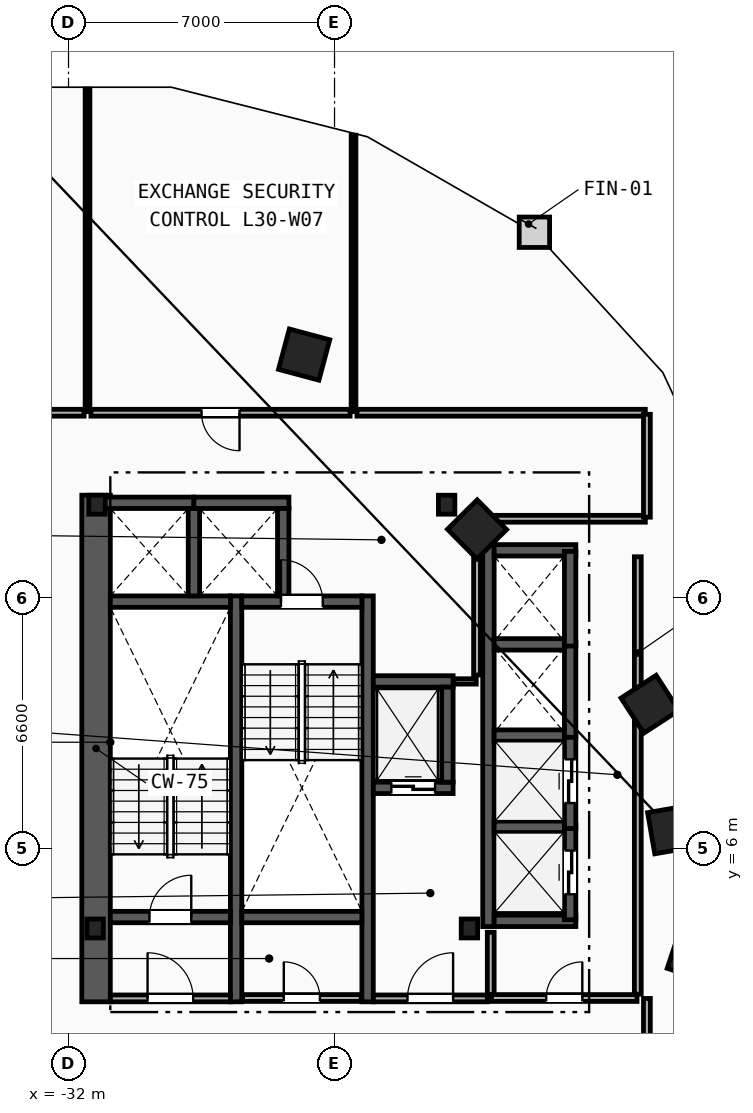
"""IFC4 building model, lengths in metres.
Left out: names, types, materials, properties, quantities, classifications, styles, units other than length and angle.
Written with IfcOpenShell. Run it as: python <this file> out.ifc"""

import sys

from ifc_helpers import new_model, si_unit, direction, frame, frame_2d, origin, origin_2d, place, context, subcontext, project, spatial, rectangle, i_section, extrude, element, fill, save


model = new_model("IFC4")
c1 = context("Model", 3, precision=1e-05, world=origin(), true_north=direction((0.0, 1.0)))
c2 = subcontext(c1, "Body", "Model", "MODEL_VIEW")
j1 = project(units=[si_unit("LENGTHUNIT", "METRE"), si_unit("PLANEANGLEUNIT", "RADIAN")], contexts=[c1])
p1 = place(None, origin())
s1 = spatial("IfcSite", under=j1, at=p1, CompositionType="ELEMENT")
p2 = place(p1, origin())
s2 = spatial("IfcBuilding", under=s1, at=p2, CompositionType="ELEMENT")
p3 = place(p2, frame((0.0, 0.0, 117.8)))
s3 = spatial("IfcBuildingStorey", under=s2, at=p3, CompositionType="ELEMENT", Elevation=117.8)
for number, where, z_axis, x_axis in (
    (1, (-31.3, 3.9, 0.0), (0.0, 0.0, 1.0), (1.0, 0.0, 0.0)),
    (2, (-21.45, 3.9, 0.0), (0.0, 0.0, 1.0), (1.0, 0.0, 0.0)),
    (3, (-22.05, 15.05, 0.0), (0.0, 0.0, 1.0), (1.0, 0.0, 0.0)),
    (4, (-31.25, 15.05, 0.0), (0.0, 0.0, 1.0), (1.0, 0.0, 0.0)),
):
    element("IfcColumn", number, at=place(p3, frame(where, z_axis=z_axis, x_axis=x_axis)), inside=s3, PredefinedType="COLUMN", context=c2, shape_type="SweptSolid", body=[
        extrude(i_section(OverallWidth=0.432, OverallDepth=0.498, WebThickness=0.056, FlangeThickness=0.089, FilletRadius=0.018, at=origin_2d()), origin(), (0.0, 0.0, 1.0), 3.6),
    ])
for number, where, z_axis, x_axis in (
    (5, (-15.55, 3.2, 0.0), (0.0, 0.0, 1.0), (0.315, 0.949, 0.0)),
    (6, (-16.125, 6.5, 0.0), (0.0, 0.0, 1.0), (-0.172, 0.985, 0.0)),
    (7, (-16.7, 9.8, 0.0), (0.0, 0.0, 1.0), (-0.544, 0.839, 0.0)),
    (8, (-21.25, 14.4, 0.0), (0.0, 0.0, 1.0), (-0.703, 0.711, 0.0)),
    (9, (-25.8, 19.0, 0.0), (0.0, 0.0, 1.0), (-0.966, 0.259, 0.0)),
):
    element("IfcColumn", number, at=place(p3, frame(where, z_axis=z_axis, x_axis=x_axis)), inside=s3, PredefinedType="COLUMN", context=c2, shape_type="SweptSolid", body=[
        extrude(rectangle(XDim=1.1, YDim=1.1, at=origin_2d()), origin(), (0.0, 0.0, 1.0), 3.6),
    ])
p4 = place(p3, frame((-31.275, 1.97, 0.0), z_axis=(0.0, 0.0, 1.0), x_axis=(0.0, 1.0, 0.0)))
e10 = element("IfcWall", 10, at=p4, inside=s3, PredefinedType="SHEAR", context=c2, shape_type="SweptSolid", body=[
    extrude(rectangle(XDim=13.33, YDim=0.75, at=frame_2d((6.665, 0.0))), origin(), (0.0, 0.0, 1.0), 3.3),
])
for number, where, z_axis, x_axis in (
    (11, (-27.59, 1.97, 0.0), (0.0, 0.0, 1.0), (0.0, 1.0, 0.0)),
    (12, (-24.13, 1.97, 0.0), (0.0, 0.0, 1.0), (0.0, 1.0, 0.0)),
):
    element("IfcWall", number, at=place(p3, frame(where, z_axis=z_axis, x_axis=x_axis)), inside=s3, PredefinedType="SHEAR", context=c2, shape_type="SweptSolid", body=[
        extrude(rectangle(XDim=10.68, YDim=0.3, at=frame_2d((5.34, 0.0))), origin(), (0.0, 0.0, 1.0), 3.3),
    ])
p5 = place(p3, frame((-30.9, 4.2, 0.0), z_axis=(0.0, 0.0, 1.0), x_axis=(1.0, 0.0, 0.0)))
e13 = element("IfcWall", 13, at=p5, inside=s3, PredefinedType="SHEAR", context=c2, shape_type="SweptSolid", body=[
    extrude(rectangle(XDim=3.16, YDim=0.3, at=frame_2d((1.58, 0.0))), origin(), (0.0, 0.0, 1.0), 3.3),
])
p6 = place(p5, frame((1.03, 0.0, 0.0)))
e14 = element("IfcOpeningElement", 14, at=p6, cuts=e13, PredefinedType="OPENING", context=c2, shape_type="SweptSolid", body=[
    extrude(rectangle(XDim=1.1, YDim=2.15, at=frame_2d((0.55, 1.075))), frame((0.0, 0.16, 0.0), z_axis=(0.0, -1.0, 0.0), x_axis=(1.0, 0.0, 0.0)), (0.0, 0.0, 1.0), 0.32),
])
p7 = place(p3, frame((-30.9, 12.5, 0.0), z_axis=(0.0, 0.0, 1.0), x_axis=(1.0, 0.0, 0.0)))
e15 = element("IfcWall", 15, at=p7, inside=s3, PredefinedType="SHEAR", context=c2, shape_type="SweptSolid", body=[
    extrude(rectangle(XDim=3.16, YDim=0.3, at=frame_2d((1.58, 0.0))), origin(), (0.0, 0.0, 1.0), 3.3),
])
p8 = place(p3, frame((-27.44, 12.5, 0.0), z_axis=(0.0, 0.0, 1.0), x_axis=(1.0, 0.0, 0.0)))
e16 = element("IfcWall", 16, at=p8, inside=s3, PredefinedType="SHEAR", context=c2, shape_type="SweptSolid", body=[
    extrude(rectangle(XDim=3.16, YDim=0.3, at=frame_2d((1.58, 0.0))), origin(), (0.0, 0.0, 1.0), 3.3),
])
p9 = place(p8, frame((1.03, 0.0, 0.0)))
e17 = element("IfcOpeningElement", 17, at=p9, cuts=e16, PredefinedType="OPENING", context=c2, shape_type="SweptSolid", body=[
    extrude(rectangle(XDim=1.1, YDim=2.15, at=frame_2d((0.55, 1.075))), frame((0.0, 0.16, 0.0), z_axis=(0.0, -1.0, 0.0), x_axis=(1.0, 0.0, 0.0)), (0.0, 0.0, 1.0), 0.32),
])
p10 = place(p3, frame((-27.44, 4.2, 0.0), z_axis=(0.0, 0.0, 1.0), x_axis=(1.0, 0.0, 0.0)))
e18 = element("IfcWall", 18, at=p10, inside=s3, PredefinedType="SHEAR", context=c2, shape_type="SweptSolid", body=[
    extrude(rectangle(XDim=3.16, YDim=0.3, at=frame_2d((1.58, 0.0))), origin(), (0.0, 0.0, 1.0), 3.3),
])
p11 = place(p3, frame((-20.89, 2.15, 0.0), z_axis=(0.0, 0.0, 1.0), x_axis=(0.0, 1.0, 0.0)))
e19 = element("IfcWall", 19, at=p11, inside=s3, PredefinedType="PARTITIONING", context=c2, shape_type="SweptSolid", body=[
    extrude(rectangle(XDim=1.65, YDim=0.18, at=frame_2d((0.825, 0.0))), origin(), (0.0, 0.0, 1.0), 3.3),
])
p12 = place(p3, frame((-23.98, 2.06, 0.0), z_axis=(0.0, 0.0, 1.0), x_axis=(1.0, 0.0, 0.0)))
e20 = element("IfcWall", 20, at=p12, inside=s3, PredefinedType="PARTITIONING", context=c2, shape_type="SweptSolid", body=[
    extrude(rectangle(XDim=3.0, YDim=0.18, at=frame_2d((1.5, 0.0))), origin(), (0.0, 0.0, 1.0), 3.3),
])
p13 = place(p12, frame((0.9, 0.0, 0.0)))
e21 = element("IfcOpeningElement", 21, at=p13, cuts=e20, PredefinedType="OPENING", context=c2, shape_type="SweptSolid", body=[
    extrude(rectangle(XDim=1.2, YDim=2.15, at=frame_2d((0.6, 1.075))), frame((0.0, 0.1, 0.0), z_axis=(0.0, -1.0, 0.0), x_axis=(1.0, 0.0, 0.0)), (0.0, 0.0, 1.0), 0.2),
])
p14 = place(p3, frame((-30.9, 2.06, 0.0), z_axis=(0.0, 0.0, 1.0), x_axis=(1.0, 0.0, 0.0)))
e22 = element("IfcWall", 22, at=p14, inside=s3, PredefinedType="PARTITIONING", context=c2, shape_type="SweptSolid", body=[
    extrude(rectangle(XDim=3.16, YDim=0.18, at=frame_2d((1.58, 0.0))), origin(), (0.0, 0.0, 1.0), 3.3),
])
p15 = place(p14, frame((0.98, 0.0, 0.0)))
e23 = element("IfcOpeningElement", 23, at=p15, cuts=e22, PredefinedType="OPENING", context=c2, shape_type="SweptSolid", body=[
    extrude(rectangle(XDim=1.2, YDim=2.15, at=frame_2d((0.6, 1.075))), frame((0.0, 0.1, 0.0), z_axis=(0.0, -1.0, 0.0), x_axis=(1.0, 0.0, 0.0)), (0.0, 0.0, 1.0), 0.2),
])
p16 = place(p3, frame((-23.98, 7.6, 0.0), z_axis=(0.0, 0.0, 1.0), x_axis=(1.0, 0.0, 0.0)))
e24 = element("IfcWall", 24, at=p16, inside=s3, PredefinedType="SHEAR", context=c2, shape_type="SweptSolid", body=[
    extrude(rectangle(XDim=2.1, YDim=0.3, at=frame_2d((1.05, 0.0))), origin(), (0.0, 0.0, 1.0), 3.3),
])
p17 = place(p16, frame((0.475, 0.0, 0.0)))
e25 = element("IfcOpeningElement", 25, at=p17, cuts=e24, PredefinedType="OPENING", context=c2, shape_type="SweptSolid", body=[
    extrude(rectangle(XDim=1.15, YDim=2.2, at=frame_2d((0.575, 1.1))), frame((0.0, 0.16, 0.0), z_axis=(0.0, -1.0, 0.0), x_axis=(1.0, 0.0, 0.0)), (0.0, 0.0, 1.0), 0.32),
])
p18 = place(p3, frame((-23.98, 10.4, 0.0), z_axis=(0.0, 0.0, 1.0), x_axis=(1.0, 0.0, 0.0)))
e26 = element("IfcWall", 26, at=p18, inside=s3, PredefinedType="SHEAR", context=c2, shape_type="SweptSolid", body=[
    extrude(rectangle(XDim=2.1, YDim=0.3, at=frame_2d((1.05, 0.0))), origin(), (0.0, 0.0, 1.0), 3.3),
])
for number, where, z_axis, x_axis in (
    (27, (-22.03, 7.75, 0.0), (0.0, 0.0, 1.0), (0.0, 1.0, 0.0)),
    (28, (-31.2, 15.1, 0.0), (0.0, 0.0, 1.0), (1.0, 0.0, 0.0)),
):
    element("IfcWall", number, at=place(p3, frame(where, z_axis=z_axis, x_axis=x_axis)), inside=s3, PredefinedType="SHEAR", context=c2, shape_type="SweptSolid", body=[
        extrude(rectangle(XDim=2.5, YDim=0.3, at=frame_2d((1.25, 0.0))), origin(), (0.0, 0.0, 1.0), 3.3),
    ])
p19 = place(p3, frame((-28.7, 12.65, 0.0), z_axis=(0.0, 0.0, 1.0), x_axis=(0.0, 1.0, 0.0)))
e29 = element("IfcWall", 29, at=p19, inside=s3, PredefinedType="SHEAR", context=c2, shape_type="SweptSolid", body=[
    extrude(rectangle(XDim=2.3, YDim=0.3, at=frame_2d((1.15, 0.0))), origin(), (0.0, 0.0, 1.0), 3.3),
])
p20 = place(p3, frame((-28.7, 15.1, 0.0), z_axis=(0.0, 0.0, 1.0), x_axis=(1.0, 0.0, 0.0)))
e30 = element("IfcWall", 30, at=p20, inside=s3, PredefinedType="SHEAR", context=c2, shape_type="SweptSolid", body=[
    extrude(rectangle(XDim=2.5, YDim=0.3, at=frame_2d((1.25, 0.0))), origin(), (0.0, 0.0, 1.0), 3.3),
])
p21 = place(p3, frame((-26.35, 12.65, 0.0), z_axis=(0.0, 0.0, 1.0), x_axis=(0.0, 1.0, 0.0)))
e31 = element("IfcWall", 31, at=p21, inside=s3, PredefinedType="SHEAR", context=c2, shape_type="SweptSolid", body=[
    extrude(rectangle(XDim=2.3, YDim=0.3, at=frame_2d((1.15, 0.0))), origin(), (0.0, 0.0, 1.0), 3.3),
])
p22 = place(p3, frame((-20.95, 3.95, 0.0), z_axis=(0.0, 0.0, 1.0), x_axis=(0.0, 1.0, 0.0)))
e32 = element("IfcWall", 32, at=p22, inside=s3, PredefinedType="SHEAR", context=c2, shape_type="SweptSolid", body=[
    extrude(rectangle(XDim=10.05, YDim=0.3, at=frame_2d((5.025, 0.0))), origin(), (0.0, 0.0, 1.0), 3.3),
])
for number, where, z_axis, x_axis in (
    (33, (-20.8, 4.1, 0.0), (0.0, 0.0, 1.0), (1.0, 0.0, 0.0)),
    (34, (-20.8, 13.85, 0.0), (0.0, 0.0, 1.0), (1.0, 0.0, 0.0)),
):
    element("IfcWall", number, at=place(p3, frame(where, z_axis=z_axis, x_axis=x_axis)), inside=s3, PredefinedType="SHEAR", context=c2, shape_type="SweptSolid", body=[
        extrude(rectangle(XDim=2.15, YDim=0.3, at=frame_2d((1.075, 0.0))), origin(), (0.0, 0.0, 1.0), 3.3),
    ])
for number, where, z_axis, x_axis in (
    (35, (-20.8, 6.575, 0.0), (0.0, 0.0, 1.0), (1.0, 0.0, 0.0)),
    (36, (-20.8, 8.975, 0.0), (0.0, 0.0, 1.0), (1.0, 0.0, 0.0)),
    (37, (-20.8, 11.375, 0.0), (0.0, 0.0, 1.0), (1.0, 0.0, 0.0)),
):
    element("IfcWall", number, at=place(p3, frame(where, z_axis=z_axis, x_axis=x_axis)), inside=s3, PredefinedType="SHEAR", context=c2, shape_type="SweptSolid", body=[
        extrude(rectangle(XDim=1.85, YDim=0.3, at=frame_2d((0.925, 0.0))), origin(), (0.0, 0.0, 1.0), 3.3),
    ])
p23 = place(p3, frame((-18.8, 4.13, 0.0), z_axis=(0.0, 0.0, 1.0), x_axis=(0.0, 1.0, 0.0)))
e38 = element("IfcWall", 38, at=p23, inside=s3, PredefinedType="SHEAR", context=c2, shape_type="SweptSolid", body=[
    extrude(rectangle(XDim=2.49, YDim=0.3, at=frame_2d((1.245, 0.0))), origin(), (0.0, 0.0, 1.0), 3.3),
])
p24 = place(p23, frame((0.67, 0.0, 0.0)))
e39 = element("IfcOpeningElement", 39, at=p24, cuts=e38, PredefinedType="OPENING", context=c2, shape_type="SweptSolid", body=[
    extrude(rectangle(XDim=1.15, YDim=2.2, at=frame_2d((0.575, 1.1))), frame((0.0, 0.16, 0.0), z_axis=(0.0, -1.0, 0.0), x_axis=(1.0, 0.0, 0.0)), (0.0, 0.0, 1.0), 0.32),
])
p25 = place(p3, frame((-18.8, 6.53, 0.0), z_axis=(0.0, 0.0, 1.0), x_axis=(0.0, 1.0, 0.0)))
e40 = element("IfcWall", 40, at=p25, inside=s3, PredefinedType="SHEAR", context=c2, shape_type="SweptSolid", body=[
    extrude(rectangle(XDim=2.49, YDim=0.3, at=frame_2d((1.245, 0.0))), origin(), (0.0, 0.0, 1.0), 3.3),
])
p26 = place(p25, frame((0.67, 0.0, 0.0)))
e41 = element("IfcOpeningElement", 41, at=p26, cuts=e40, PredefinedType="OPENING", context=c2, shape_type="SweptSolid", body=[
    extrude(rectangle(XDim=1.15, YDim=2.2, at=frame_2d((0.575, 1.1))), frame((0.0, 0.16, 0.0), z_axis=(0.0, -1.0, 0.0), x_axis=(1.0, 0.0, 0.0)), (0.0, 0.0, 1.0), 0.32),
])
for number, where, z_axis, x_axis in (
    (42, (-18.8, 8.93, 0.0), (0.0, 0.0, 1.0), (0.0, 1.0, 0.0)),
    (43, (-18.8, 11.33, 0.0), (0.0, 0.0, 1.0), (0.0, 1.0, 0.0)),
):
    element("IfcWall", number, at=place(p3, frame(where, z_axis=z_axis, x_axis=x_axis)), inside=s3, PredefinedType="SHEAR", context=c2, shape_type="SweptSolid", body=[
        extrude(rectangle(XDim=2.49, YDim=0.3, at=frame_2d((1.245, 0.0))), origin(), (0.0, 0.0, 1.0), 3.3),
    ])
p27 = place(p3, frame((-17.02, 2.17, 0.0), z_axis=(0.0, 0.0, 1.0), x_axis=(0.0, 1.0, 0.0)))
e44 = element("IfcWall", 44, at=p27, inside=s3, PredefinedType="PARTITIONING", context=c2, shape_type="SweptSolid", body=[
    extrude(rectangle(XDim=11.51, YDim=0.18, at=frame_2d((5.755, 0.0))), origin(), (0.0, 0.0, 1.0), 3.3),
])
p28 = place(p3, frame((-20.87, 2.07, 0.0), z_axis=(0.0, 0.0, 1.0), x_axis=(1.0, 0.0, 0.0)))
e45 = element("IfcWall", 45, at=p28, inside=s3, PredefinedType="PARTITIONING", context=c2, shape_type="SweptSolid", body=[
    extrude(rectangle(XDim=3.83, YDim=0.18, at=frame_2d((1.915, 0.0))), origin(), (0.0, 0.0, 1.0), 3.3),
])
p29 = place(p28, frame((1.44, 0.0, 0.0)))
e46 = element("IfcOpeningElement", 46, at=p29, cuts=e45, PredefinedType="OPENING", context=c2, shape_type="SweptSolid", body=[
    extrude(rectangle(XDim=0.95, YDim=2.1, at=frame_2d((0.475, 1.05))), frame((0.0, 0.1, 0.0), z_axis=(0.0, -1.0, 0.0), x_axis=(1.0, 0.0, 0.0)), (0.0, 0.0, 1.0), 0.2),
])
p30 = place(p3, frame((-21.86, 10.4, 0.0), z_axis=(0.0, 0.0, 1.0), x_axis=(1.0, 0.0, 0.0)))
e47 = element("IfcWall", 47, at=p30, inside=s3, PredefinedType="PARTITIONING", context=c2, shape_type="SweptSolid", body=[
    extrude(rectangle(XDim=0.59, YDim=0.14, at=frame_2d((0.295, 0.0))), origin(), (0.0, 0.0, 1.0), 3.3),
])
p31 = place(p3, frame((-21.25, 10.57, 0.0), z_axis=(0.0, 0.0, 1.0), x_axis=(0.0, 1.0, 0.0)))
e48 = element("IfcWall", 48, at=p31, inside=s3, PredefinedType="PARTITIONING", context=c2, shape_type="SweptSolid", body=[
    extrude(rectangle(XDim=4.36, YDim=0.18, at=frame_2d((2.18, 0.0))), origin(), (0.0, 0.0, 1.0), 3.3),
])
p32 = place(p3, frame((-27.42, 2.07, 0.0), z_axis=(0.0, 0.0, 1.0), x_axis=(1.0, 0.0, 0.0)))
e49 = element("IfcWall", 49, at=p32, inside=s3, PredefinedType="PARTITIONING", context=c2, shape_type="SweptSolid", body=[
    extrude(rectangle(XDim=3.12, YDim=0.18, at=frame_2d((1.56, 0.0))), origin(), (0.0, 0.0, 1.0), 3.3),
])
p33 = place(p32, frame((1.085, 0.0, 0.0)))
e50 = element("IfcOpeningElement", 50, at=p33, cuts=e49, PredefinedType="OPENING", context=c2, shape_type="SweptSolid", body=[
    extrude(rectangle(XDim=0.95, YDim=2.1, at=frame_2d((0.475, 1.05))), frame((0.0, 0.1, 0.0), z_axis=(0.0, -1.0, 0.0), x_axis=(1.0, 0.0, 0.0)), (0.0, 0.0, 1.0), 0.2),
])
p34 = place(p3, frame((-31.5, 17.5, 0.0), z_axis=(0.0, 0.0, 1.0), x_axis=(0.0, 1.0, 0.0)))
e51 = element("IfcWall", 51, at=p34, inside=s3, PredefinedType="PARTITIONING", context=c2, shape_type="SweptSolid", body=[
    extrude(rectangle(XDim=8.485, YDim=0.125, at=frame_2d((4.243, 0.0))), origin(), (0.0, 0.0, 1.0), 3.3),
])
p35 = place(p3, frame((-24.5, 17.5, 0.0), z_axis=(0.0, 0.0, 1.0), x_axis=(0.0, 1.0, 0.0)))
e52 = element("IfcWall", 52, at=p35, inside=s3, PredefinedType="PARTITIONING", context=c2, shape_type="SweptSolid", body=[
    extrude(rectangle(XDim=7.272, YDim=0.125, at=frame_2d((3.636, 0.0))), origin(), (0.0, 0.0, 1.0), 3.3),
])
p36 = place(p3, frame((-16.822, 17.47, 0.0), z_axis=(0.0, 0.0, 1.0), x_axis=(-1.0, 0.0, 0.0)))
e53 = element("IfcWall", 53, at=p36, inside=s3, PredefinedType="PARTITIONING", context=c2, shape_type="SweptSolid", body=[
    extrude(rectangle(XDim=7.588, YDim=0.18, at=frame_2d((3.794, 0.0))), origin(), (0.0, 0.0, 1.0), 3.3),
])
p37 = place(p3, frame((-21.178, 14.68, 0.0), z_axis=(0.0, 0.0, 1.0), x_axis=(1.0, 0.0, 0.0)))
e54 = element("IfcWall", 54, at=p37, inside=s3, PredefinedType="PARTITIONING", context=c2, shape_type="SweptSolid", body=[
    extrude(rectangle(XDim=4.357, YDim=0.18, at=frame_2d((2.178, 0.0))), origin(), (0.0, 0.0, 1.0), 3.3),
])
p38 = place(p3, frame((-16.78, 14.721, 0.0), z_axis=(0.0, 0.0, 1.0), x_axis=(0.0, 1.0, 0.0)))
e55 = element("IfcWall", 55, at=p38, inside=s3, PredefinedType="PARTITIONING", context=c2, shape_type="SweptSolid", body=[
    extrude(rectangle(XDim=2.707, YDim=0.18, at=frame_2d((1.354, 0.0))), origin(), (0.0, 0.0, 1.0), 3.3),
])
p39 = place(p3, frame((-16.78, -0.329, 0.0), z_axis=(0.0, 0.0, 1.0), x_axis=(0.0, 1.0, 0.0)))
e56 = element("IfcWall", 56, at=p39, inside=s3, PredefinedType="PARTITIONING", context=c2, shape_type="SweptSolid", body=[
    extrude(rectangle(XDim=2.387, YDim=0.18, at=frame_2d((1.194, 0.0))), origin(), (0.0, 0.0, 1.0), 3.3),
])
p40 = place(p3, frame((-31.59, 17.47, 0.0), z_axis=(0.0, 0.0, 1.0), x_axis=(-1.0, 0.0, 0.0)))
e57 = element("IfcWall", 57, at=p40, inside=s3, PredefinedType="PARTITIONING", context=c2, shape_type="SweptSolid", body=[
    extrude(rectangle(XDim=2.038, YDim=0.18, at=frame_2d((1.019, 0.0))), origin(), (0.0, 0.0, 1.0), 3.3),
])
p41 = place(p3, frame((-24.59, 17.47, 0.0), z_axis=(0.0, 0.0, 1.0), x_axis=(-1.0, 0.0, 0.0)))
e58 = element("IfcWall", 58, at=p41, inside=s3, PredefinedType="PARTITIONING", context=c2, shape_type="SweptSolid", body=[
    extrude(rectangle(XDim=6.82, YDim=0.18, at=frame_2d((3.41, 0.0))), origin(), (0.0, 0.0, 1.0), 3.3),
])
p42 = place(p41, frame((2.91, 0.0, 0.0)))
e59 = element("IfcOpeningElement", 59, at=p42, cuts=e58, PredefinedType="OPENING", context=c2, shape_type="SweptSolid", body=[
    extrude(rectangle(XDim=1.0, YDim=2.15, at=frame_2d((0.5, 1.075))), frame((0.0, 0.1, 0.0), z_axis=(0.0, -1.0, 0.0), x_axis=(1.0, 0.0, 0.0)), (0.0, 0.0, 1.0), 0.2),
])
p43 = place(p6, origin())
e60 = element("IfcDoor", 60, at=p43, inside=s3, OperationType="SINGLE_SWING_RIGHT", PredefinedType="DOOR", context=c2, shape_type="SweptSolid", body=[
    extrude(rectangle(XDim=1.1, YDim=2.15, at=frame_2d((0.55, 1.075))), frame((0.0, 0.025, 0.0), z_axis=(0.0, -1.0, 0.0), x_axis=(1.0, 0.0, 0.0)), (0.0, 0.0, 1.0), 0.05),
])
fill(e14, e60)
p44 = place(p9, origin())
e61 = element("IfcDoor", 61, at=p44, inside=s3, OperationType="SINGLE_SWING_LEFT", PredefinedType="DOOR", context=c2, shape_type="SweptSolid", body=[
    extrude(rectangle(XDim=1.1, YDim=2.15, at=frame_2d((0.55, 1.075))), frame((0.0, 0.025, 0.0), z_axis=(0.0, -1.0, 0.0), x_axis=(1.0, 0.0, 0.0)), (0.0, 0.0, 1.0), 0.05),
])
fill(e17, e61)
p45 = place(p13, origin())
e62 = element("IfcDoor", 62, at=p45, inside=s3, OperationType="SINGLE_SWING_RIGHT", PredefinedType="DOOR", context=c2, shape_type="SweptSolid", body=[
    extrude(rectangle(XDim=1.2, YDim=2.15, at=frame_2d((0.6, 1.075))), frame((0.0, 0.025, 0.0), z_axis=(0.0, -1.0, 0.0), x_axis=(1.0, 0.0, 0.0)), (0.0, 0.0, 1.0), 0.05),
])
fill(e21, e62)
p46 = place(p15, origin())
e63 = element("IfcDoor", 63, at=p46, inside=s3, OperationType="SINGLE_SWING_LEFT", PredefinedType="DOOR", context=c2, shape_type="SweptSolid", body=[
    extrude(rectangle(XDim=1.2, YDim=2.15, at=frame_2d((0.6, 1.075))), frame((0.0, 0.025, 0.0), z_axis=(0.0, -1.0, 0.0), x_axis=(1.0, 0.0, 0.0)), (0.0, 0.0, 1.0), 0.05),
])
fill(e23, e63)
p47 = place(p17, origin())
e64 = element("IfcDoor", 64, at=p47, inside=s3, OperationType="SLIDING_TO_LEFT", PredefinedType="TRAPDOOR", context=c2, shape_type="SweptSolid", body=[
    extrude(rectangle(XDim=1.15, YDim=2.2, at=frame_2d((0.575, 1.1))), frame((0.0, 0.025, 0.0), z_axis=(0.0, -1.0, 0.0), x_axis=(1.0, 0.0, 0.0)), (0.0, 0.0, 1.0), 0.05),
])
fill(e25, e64)
p48 = place(p24, origin())
e65 = element("IfcDoor", 65, at=p48, inside=s3, OperationType="SLIDING_TO_LEFT", PredefinedType="TRAPDOOR", context=c2, shape_type="SweptSolid", body=[
    extrude(rectangle(XDim=1.15, YDim=2.2, at=frame_2d((0.575, 1.1))), frame((0.0, 0.025, 0.0), z_axis=(0.0, -1.0, 0.0), x_axis=(1.0, 0.0, 0.0)), (0.0, 0.0, 1.0), 0.05),
])
fill(e39, e65)
p49 = place(p26, origin())
e66 = element("IfcDoor", 66, at=p49, inside=s3, OperationType="SLIDING_TO_LEFT", PredefinedType="TRAPDOOR", context=c2, shape_type="SweptSolid", body=[
    extrude(rectangle(XDim=1.15, YDim=2.2, at=frame_2d((0.575, 1.1))), frame((0.0, 0.025, 0.0), z_axis=(0.0, -1.0, 0.0), x_axis=(1.0, 0.0, 0.0)), (0.0, 0.0, 1.0), 0.05),
])
fill(e41, e66)
p50 = place(p42, origin())
e67 = element("IfcDoor", 67, at=p50, inside=s3, OperationType="SINGLE_SWING_LEFT", PredefinedType="DOOR", context=c2, shape_type="SweptSolid", body=[
    extrude(rectangle(XDim=1.0, YDim=2.15, at=frame_2d((0.5, 1.075))), frame((0.0, 0.025, 0.0), z_axis=(0.0, -1.0, 0.0), x_axis=(1.0, 0.0, 0.0)), (0.0, 0.0, 1.0), 0.05),
])
fill(e59, e67)
p51 = place(p29, origin())
e68 = element("IfcDoor", 68, at=p51, inside=s3, OperationType="SINGLE_SWING_RIGHT", PredefinedType="DOOR", context=c2, shape_type="SweptSolid", body=[
    extrude(rectangle(XDim=0.95, YDim=2.1, at=frame_2d((0.475, 1.05))), frame((0.0, 0.025, 0.0), z_axis=(0.0, -1.0, 0.0), x_axis=(1.0, 0.0, 0.0)), (0.0, 0.0, 1.0), 0.05),
])
fill(e46, e68)
p52 = place(p33, origin())
e69 = element("IfcDoor", 69, at=p52, inside=s3, OperationType="SINGLE_SWING_LEFT", PredefinedType="DOOR", context=c2, shape_type="SweptSolid", body=[
    extrude(rectangle(XDim=0.95, YDim=2.1, at=frame_2d((0.475, 1.05))), frame((0.0, 0.025, 0.0), z_axis=(0.0, -1.0, 0.0), x_axis=(1.0, 0.0, 0.0)), (0.0, 0.0, 1.0), 0.05),
])
fill(e50, e69)
save(model, sys.argv[1])
